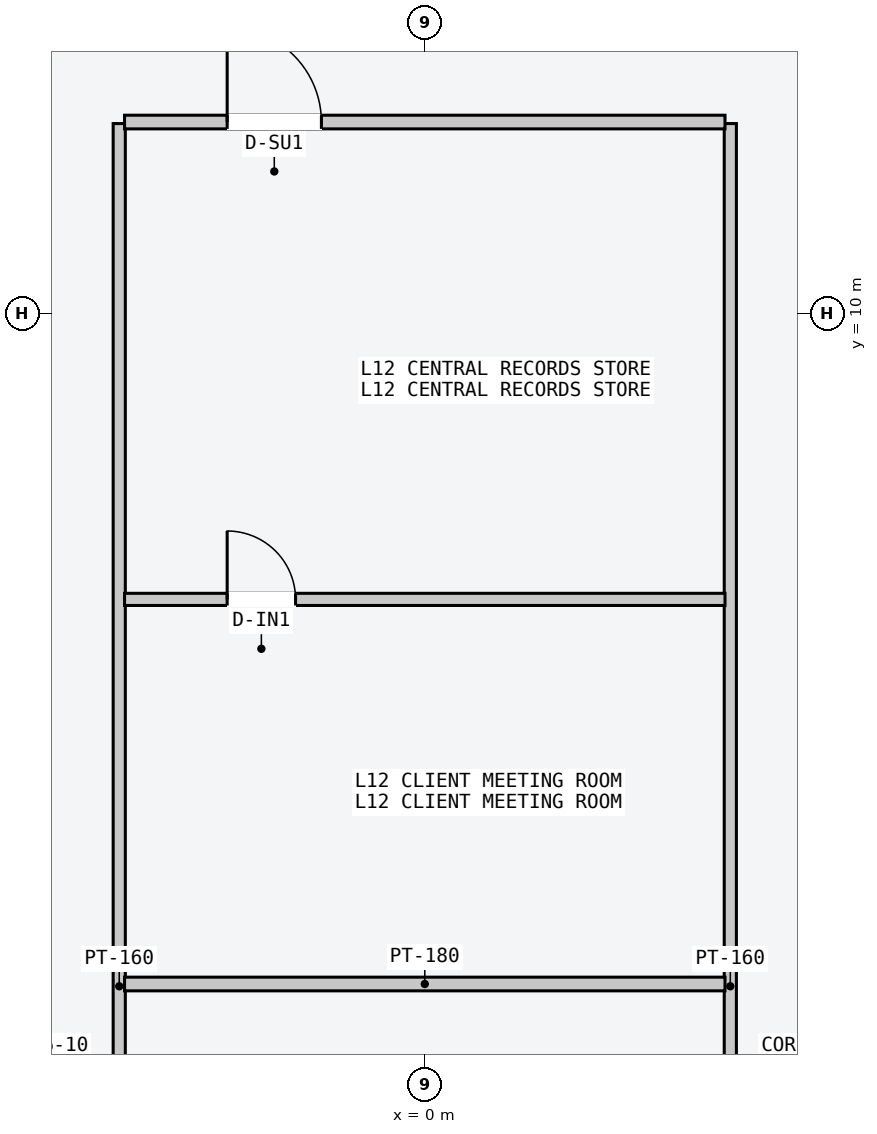
"""IFC4 building model, lengths in metres.
Left out: names, types, materials, properties, quantities, classifications, styles, units other than length and angle.
Written with IfcOpenShell. Run it as: python <this file> out.ifc"""

import sys

from ifc_helpers import new_model, si_unit, direction, frame, frame_2d, origin, place, context, subcontext, project, spatial, rectangle, extrude, element, fill, save


model = new_model("IFC4")
c1 = context("Model", 3, precision=1e-05, world=origin(), true_north=direction((0.0, 1.0)))
c2 = subcontext(c1, "Body", "Model", "MODEL_VIEW")
j1 = project(units=[si_unit("LENGTHUNIT", "METRE"), si_unit("PLANEANGLEUNIT", "RADIAN")], contexts=[c1])
p1 = place(None, origin())
s1 = spatial("IfcSite", under=j1, at=p1, CompositionType="ELEMENT")
p2 = place(p1, origin())
s2 = spatial("IfcBuilding", under=s1, at=p2, CompositionType="ELEMENT")
p3 = place(p2, frame((0.0, 0.0, 49.2)))
s3 = spatial("IfcBuildingStorey", under=s2, at=p3, CompositionType="ELEMENT", Elevation=49.2)
for number, where, z_axis, x_axis in (
    (1, (-4.02, -10.2, 0.0), (0.0, 0.0, 1.0), (0.0, 1.0, 0.0)),
    (2, (4.02, -10.2, 0.0), (0.0, 0.0, 1.0), (0.0, 1.0, 0.0)),
):
    element("IfcWall", number, at=place(p3, frame(where, z_axis=z_axis, x_axis=x_axis)), inside=s3, PredefinedType="PARTITIONING", context=c2, shape_type="SweptSolid", body=[
        extrude(rectangle(XDim=22.7, YDim=0.16, at=frame_2d((11.35, 0.0))), origin(), (0.0, 0.0, 1.0), 3.4),
    ])
p4 = place(p3, frame((-3.95, 1.18, 0.0), z_axis=(0.0, 0.0, 1.0), x_axis=(1.0, 0.0, 0.0)))
e3 = element("IfcWall", 3, at=p4, inside=s3, PredefinedType="PARTITIONING", context=c2, shape_type="SweptSolid", body=[
    extrude(rectangle(XDim=7.9, YDim=0.18, at=frame_2d((3.95, 0.0))), origin(), (0.0, 0.0, 1.0), 3.4),
])
p5 = place(p3, frame((-3.95, 12.52, 0.0), z_axis=(0.0, 0.0, 1.0), x_axis=(1.0, 0.0, 0.0)))
e4 = element("IfcWall", 4, at=p5, inside=s3, PredefinedType="PARTITIONING", context=c2, shape_type="SweptSolid", body=[
    extrude(rectangle(XDim=7.9, YDim=0.18, at=frame_2d((3.95, 0.0))), origin(), (0.0, 0.0, 1.0), 3.4),
])
p6 = place(p5, frame((1.35, 0.0, 0.0)))
e5 = element("IfcOpeningElement", 5, at=p6, cuts=e4, PredefinedType="OPENING", context=c2, shape_type="SweptSolid", body=[
    extrude(rectangle(XDim=1.24, YDim=2.24, at=frame_2d((0.62, 1.12))), frame((0.0, 0.1, 0.0), z_axis=(0.0, -1.0, 0.0), x_axis=(1.0, 0.0, 0.0)), (0.0, 0.0, 1.0), 0.2),
])
p7 = place(p3, frame((-3.95, 6.24, 0.0), z_axis=(0.0, 0.0, 1.0), x_axis=(1.0, 0.0, 0.0)))
e6 = element("IfcWall", 6, at=p7, inside=s3, PredefinedType="PARTITIONING", context=c2, shape_type="SweptSolid", body=[
    extrude(rectangle(XDim=7.9, YDim=0.16, at=frame_2d((3.95, 0.0))), origin(), (0.0, 0.0, 1.0), 3.4),
])
p8 = place(p7, frame((1.35, 0.0, 0.0)))
e7 = element("IfcOpeningElement", 7, at=p8, cuts=e6, PredefinedType="OPENING", context=c2, shape_type="SweptSolid", body=[
    extrude(rectangle(XDim=0.9, YDim=2.15, at=frame_2d((0.45, 1.075))), frame((0.0, 0.09, 0.0), z_axis=(0.0, -1.0, 0.0), x_axis=(1.0, 0.0, 0.0)), (0.0, 0.0, 1.0), 0.18),
])
p9 = place(p6, origin())
e8 = element("IfcDoor", 8, at=p9, inside=s3, OperationType="SINGLE_SWING_LEFT", PredefinedType="DOOR", context=c2, shape_type="SweptSolid", body=[
    extrude(rectangle(XDim=1.24, YDim=2.24, at=frame_2d((0.62, 1.12))), frame((0.0, 0.025, 0.0), z_axis=(0.0, -1.0, 0.0), x_axis=(1.0, 0.0, 0.0)), (0.0, 0.0, 1.0), 0.05),
])
fill(e5, e8)
p10 = place(p8, origin())
e9 = element("IfcDoor", 9, at=p10, inside=s3, OperationType="SINGLE_SWING_LEFT", PredefinedType="DOOR", context=c2, shape_type="SweptSolid", body=[
    extrude(rectangle(XDim=0.9, YDim=2.15, at=frame_2d((0.45, 1.075))), frame((0.0, 0.025, 0.0), z_axis=(0.0, -1.0, 0.0), x_axis=(1.0, 0.0, 0.0)), (0.0, 0.0, 1.0), 0.05),
])
fill(e7, e9)
save(model, sys.argv[1])
